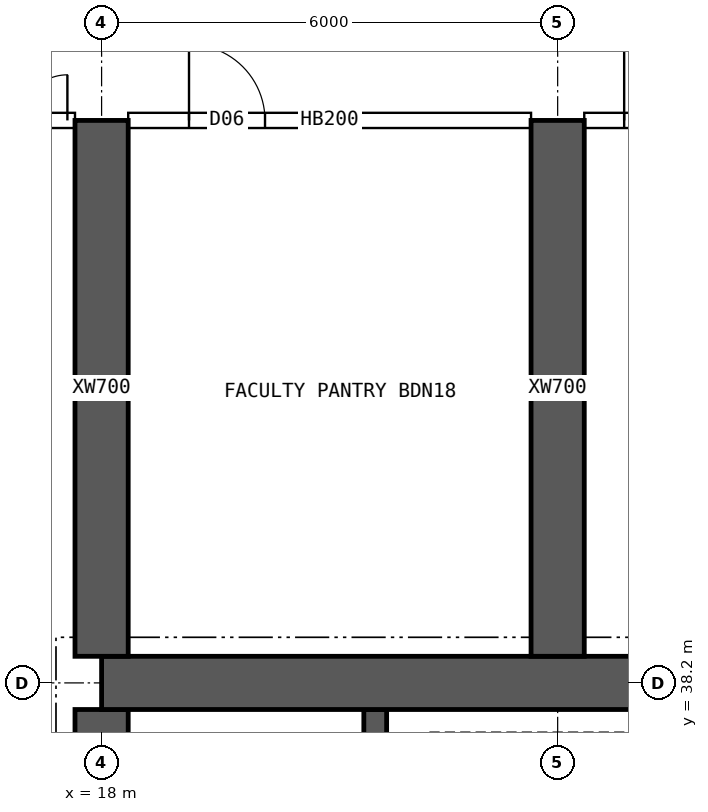
"""IFC4 building model, lengths in metres.
Left out: names, types, materials, properties, quantities, classifications, styles, units other than length and angle.
Written with IfcOpenShell. Run it as: python <this file> out.ifc"""

import sys

from ifc_helpers import new_model, si_unit, direction, frame, frame_2d, origin, place, context, subcontext, project, spatial, rectangle, extrude, element, fill, save


model = new_model("IFC4")
c1 = context("Model", 3, precision=1e-05, world=origin(), true_north=direction((0.0, 1.0)))
c2 = subcontext(c1, "Body", "Model", "MODEL_VIEW")
j1 = project(units=[si_unit("LENGTHUNIT", "METRE"), si_unit("PLANEANGLEUNIT", "RADIAN")], contexts=[c1])
p1 = place(None, origin())
s1 = spatial("IfcSite", under=j1, at=p1, CompositionType="ELEMENT")
p2 = place(p1, origin())
s2 = spatial("IfcBuilding", under=s1, at=p2, CompositionType="ELEMENT")
p3 = place(p2, frame((0.0, 0.0, 227.8)))
s3 = spatial("IfcBuildingStorey", under=s2, at=p3, CompositionType="ELEMENT", Elevation=227.8)
p4 = place(p3, frame((18.0, 38.2, 0.0), z_axis=(0.0, 0.0, 1.0), x_axis=(1.0, 0.0, 0.0)))
e1 = element("IfcWall", 1, at=p4, inside=s3, PredefinedType="SHEAR", context=c2, shape_type="SweptSolid", body=[
    extrude(rectangle(XDim=48.0, YDim=0.7, at=frame_2d((24.0, 0.0))), origin(), (0.0, 0.0, 1.0), 3.75),
])
p5 = place(p3, frame((18.0, 26.15, 0.0), z_axis=(0.0, 0.0, 1.0), x_axis=(0.0, 1.0, 0.0)))
e2 = element("IfcWall", 2, at=p5, inside=s3, PredefinedType="SHEAR", context=c2, shape_type="SweptSolid", body=[
    extrude(rectangle(XDim=11.7, YDim=0.7, at=frame_2d((5.85, 0.0))), origin(), (0.0, 0.0, 1.0), 3.75),
])
p6 = place(p5, frame((5.15, 0.0, 0.0)))
e3 = element("IfcOpeningElement", 3, at=p6, cuts=e2, PredefinedType="OPENING", context=c2, shape_type="SweptSolid", body=[
    extrude(rectangle(XDim=1.2, YDim=2.1, at=frame_2d((0.6, 1.05))), frame((0.0, 0.36, 0.0), z_axis=(0.0, -1.0, 0.0), x_axis=(1.0, 0.0, 0.0)), (0.0, 0.0, 1.0), 0.72),
])
p7 = place(p3, frame((21.6, 34.75, 0.0), z_axis=(0.0, 0.0, 1.0), x_axis=(0.0, 1.0, 0.0)))
e4 = element("IfcWall", 4, at=p7, inside=s3, PredefinedType="SHEAR", context=c2, shape_type="SweptSolid", body=[
    extrude(rectangle(XDim=3.1, YDim=0.3, at=frame_2d((1.55, 0.0))), origin(), (0.0, 0.0, 1.0), 3.75),
])
for number, where, z_axis, x_axis in (
    (5, (18.0, 38.55, 0.0), (0.0, 0.0, 1.0), (0.0, 1.0, 0.0)),
    (6, (24.0, 38.55, 0.0), (0.0, 0.0, 1.0), (0.0, 1.0, 0.0)),
):
    element("IfcWall", number, at=place(p3, frame(where, z_axis=z_axis, x_axis=x_axis)), inside=s3, PredefinedType="SHEAR", context=c2, shape_type="SweptSolid", body=[
        extrude(rectangle(XDim=7.05, YDim=0.7, at=frame_2d((3.525, 0.0))), origin(), (0.0, 0.0, 1.0), 3.75),
    ])
p8 = place(p3, frame((15.6, 45.6, 0.0), z_axis=(0.0, 0.0, 1.0), x_axis=(1.0, 0.0, 0.0)))
e7 = element("IfcWall", 7, at=p8, inside=s3, PredefinedType="SOLIDWALL", context=c2, shape_type="SweptSolid", body=[
    extrude(rectangle(XDim=2.05, YDim=0.2, at=frame_2d((1.025, 0.0))), origin(), (0.0, 0.0, 1.0), 3.3),
])
p9 = place(p8, frame((0.75, 0.0, 0.0)))
e8 = element("IfcOpeningElement", 8, at=p9, cuts=e7, PredefinedType="OPENING", context=c2, shape_type="SweptSolid", body=[
    extrude(rectangle(XDim=1.2, YDim=2.1, at=frame_2d((0.6, 1.05))), frame((0.0, 0.11, 0.0), z_axis=(0.0, -1.0, 0.0), x_axis=(1.0, 0.0, 0.0)), (0.0, 0.0, 1.0), 0.22),
])
p10 = place(p3, frame((18.35, 45.6, 0.0), z_axis=(0.0, 0.0, 1.0), x_axis=(1.0, 0.0, 0.0)))
e9 = element("IfcWall", 9, at=p10, inside=s3, PredefinedType="SOLIDWALL", context=c2, shape_type="SweptSolid", body=[
    extrude(rectangle(XDim=5.3, YDim=0.2, at=frame_2d((2.65, 0.0))), origin(), (0.0, 0.0, 1.0), 3.3),
])
p11 = place(p10, frame((0.8, 0.0, 0.0)))
e10 = element("IfcOpeningElement", 10, at=p11, cuts=e9, PredefinedType="OPENING", context=c2, shape_type="SweptSolid", body=[
    extrude(rectangle(XDim=1.0, YDim=2.1, at=frame_2d((0.5, 1.05))), frame((0.0, 0.11, 0.0), z_axis=(0.0, -1.0, 0.0), x_axis=(1.0, 0.0, 0.0)), (0.0, 0.0, 1.0), 0.22),
])
p12 = place(p3, frame((24.35, 45.6, 0.0), z_axis=(0.0, 0.0, 1.0), x_axis=(1.0, 0.0, 0.0)))
e11 = element("IfcWall", 11, at=p12, inside=s3, PredefinedType="SOLIDWALL", context=c2, shape_type="SweptSolid", body=[
    extrude(rectangle(XDim=5.3, YDim=0.2, at=frame_2d((2.65, 0.0))), origin(), (0.0, 0.0, 1.0), 3.3),
])
p13 = place(p12, frame((0.525, 0.0, 0.0)))
e12 = element("IfcOpeningElement", 12, at=p13, cuts=e11, PredefinedType="OPENING", context=c2, shape_type="SweptSolid", body=[
    extrude(rectangle(XDim=1.0, YDim=2.1, at=frame_2d((0.5, 1.05))), frame((0.0, 0.11, 0.0), z_axis=(0.0, -1.0, 0.0), x_axis=(1.0, 0.0, 0.0)), (0.0, 0.0, 1.0), 0.22),
])
p14 = place(p9, origin())
e13 = element("IfcDoor", 13, at=p14, inside=s3, OperationType="DOUBLE_DOOR_SINGLE_SWING", PredefinedType="DOOR", context=c2, shape_type="SweptSolid", body=[
    extrude(rectangle(XDim=1.2, YDim=2.1, at=frame_2d((0.6, 1.05))), frame((0.0, 0.025, 0.0), z_axis=(0.0, -1.0, 0.0), x_axis=(1.0, 0.0, 0.0)), (0.0, 0.0, 1.0), 0.05),
])
fill(e8, e13)
p15 = place(p11, origin())
e14 = element("IfcDoor", 14, at=p15, inside=s3, OperationType="SINGLE_SWING_LEFT", PredefinedType="DOOR", context=c2, shape_type="SweptSolid", body=[
    extrude(rectangle(XDim=1.0, YDim=2.1, at=frame_2d((0.5, 1.05))), frame((0.0, 0.025, 0.0), z_axis=(0.0, -1.0, 0.0), x_axis=(1.0, 0.0, 0.0)), (0.0, 0.0, 1.0), 0.05),
])
fill(e10, e14)
p16 = place(p13, origin())
e15 = element("IfcDoor", 15, at=p16, inside=s3, OperationType="SINGLE_SWING_LEFT", PredefinedType="DOOR", context=c2, shape_type="SweptSolid", body=[
    extrude(rectangle(XDim=1.0, YDim=2.1, at=frame_2d((0.5, 1.05))), frame((0.0, 0.025, 0.0), z_axis=(0.0, -1.0, 0.0), x_axis=(1.0, 0.0, 0.0)), (0.0, 0.0, 1.0), 0.05),
])
fill(e12, e15)
save(model, sys.argv[1])
